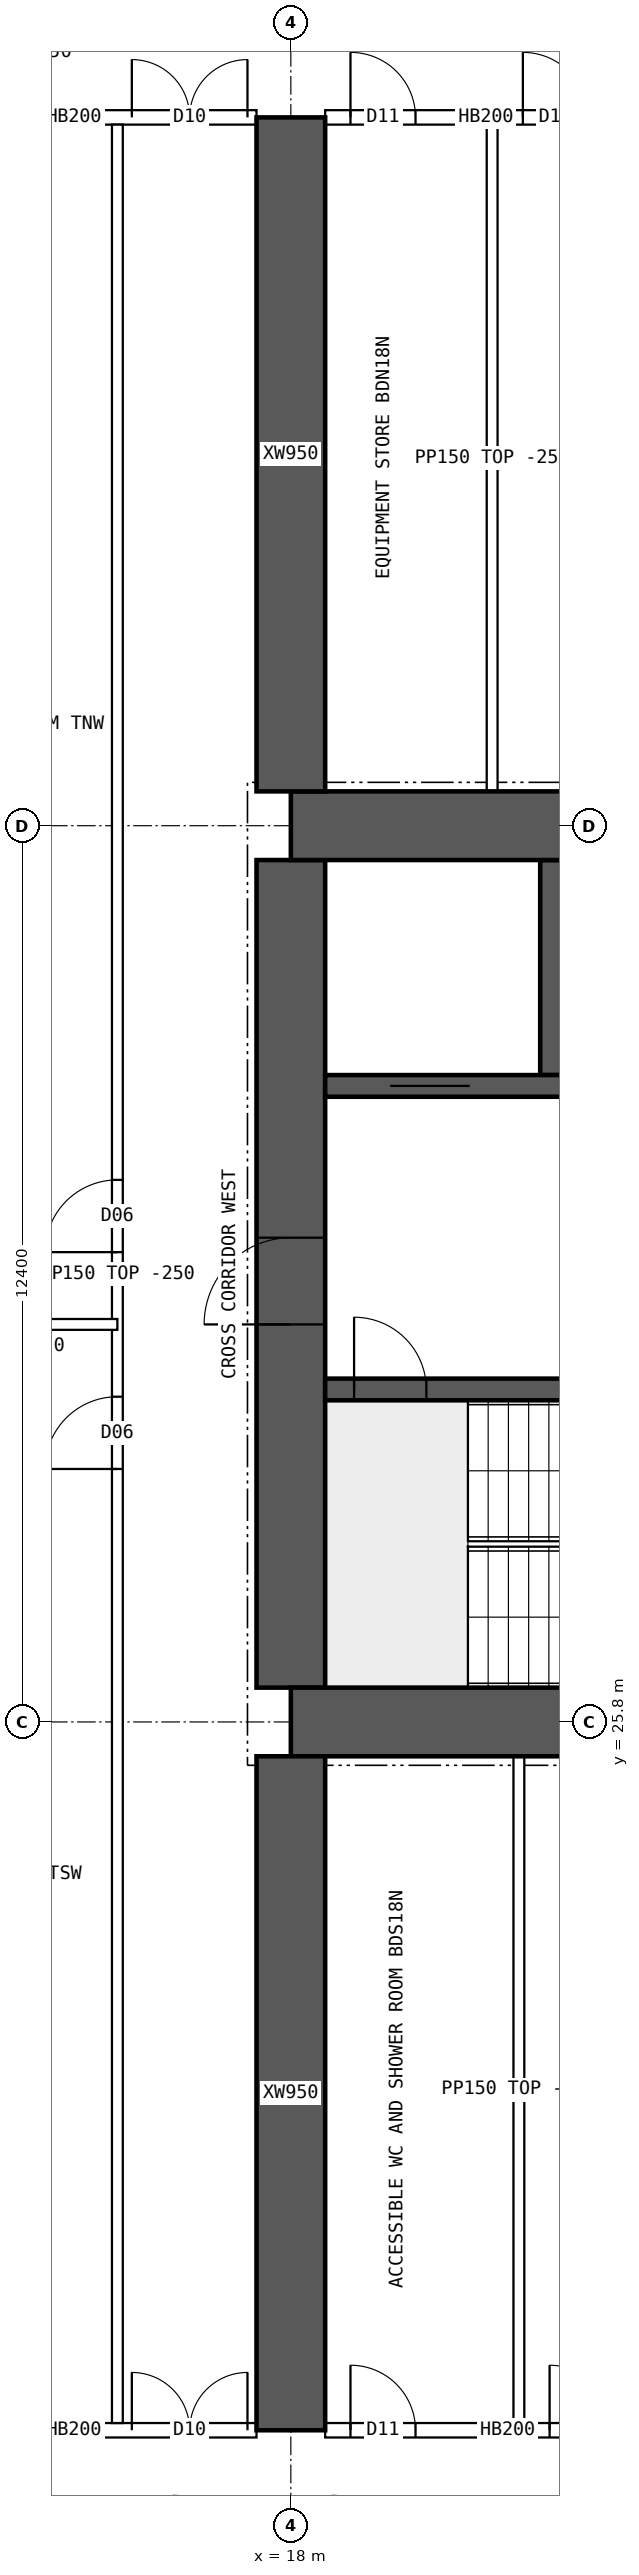
"""IFC4 building model, lengths in metres.
Left out: names, types, materials, properties, quantities, classifications, styles, units other than length and angle.
Written with IfcOpenShell. Run it as: python <this file> out.ifc"""

import sys

from ifc_helpers import new_model, si_unit, direction, frame, frame_2d, origin, place, context, subcontext, project, spatial, rectangle, extrude, element, fill, save


model = new_model("IFC4")
c1 = context("Model", 3, precision=1e-05, world=origin(), true_north=direction((0.0, 1.0)))
c2 = subcontext(c1, "Body", "Model", "MODEL_VIEW")
j1 = project(units=[si_unit("LENGTHUNIT", "METRE"), si_unit("PLANEANGLEUNIT", "RADIAN")], contexts=[c1])
p1 = place(None, origin())
s1 = spatial("IfcSite", under=j1, at=p1, CompositionType="ELEMENT")
p2 = place(p1, origin())
s2 = spatial("IfcBuilding", under=s1, at=p2, CompositionType="ELEMENT")
p3 = place(p2, frame((0.0, 0.0, 114.4)))
s3 = spatial("IfcBuildingStorey", under=s2, at=p3, CompositionType="ELEMENT", Elevation=114.4)
for number, where, z_axis, x_axis in (
    (1, (18.0, 25.8, 0.0), (0.0, 0.0, 1.0), (1.0, 0.0, 0.0)),
    (2, (18.0, 38.2, 0.0), (0.0, 0.0, 1.0), (1.0, 0.0, 0.0)),
):
    element("IfcWall", number, at=place(p3, frame(where, z_axis=z_axis, x_axis=x_axis)), inside=s3, PredefinedType="SHEAR", context=c2, shape_type="SweptSolid", body=[
        extrude(rectangle(XDim=48.0, YDim=0.95, at=frame_2d((24.0, 0.0))), origin(), (0.0, 0.0, 1.0), 3.75),
    ])
p4 = place(p3, frame((18.0, 26.275, 0.0), z_axis=(0.0, 0.0, 1.0), x_axis=(0.0, 1.0, 0.0)))
e3 = element("IfcWall", 3, at=p4, inside=s3, PredefinedType="SHEAR", context=c2, shape_type="SweptSolid", body=[
    extrude(rectangle(XDim=11.45, YDim=0.95, at=frame_2d((5.725, 0.0))), origin(), (0.0, 0.0, 1.0), 3.75),
])
p5 = place(p4, frame((5.025, 0.0, 0.0)))
e4 = element("IfcOpeningElement", 4, at=p5, cuts=e3, PredefinedType="OPENING", context=c2, shape_type="SweptSolid", body=[
    extrude(rectangle(XDim=1.2, YDim=2.1, at=frame_2d((0.6, 1.05))), frame((0.0, 0.485, 0.0), z_axis=(0.0, -1.0, 0.0), x_axis=(1.0, 0.0, 0.0)), (0.0, 0.0, 1.0), 0.97),
])
p6 = place(p3, frame((18.475, 30.4, 0.0), z_axis=(0.0, 0.0, 1.0), x_axis=(1.0, 0.0, 0.0)))
e5 = element("IfcWall", 5, at=p6, inside=s3, PredefinedType="SHEAR", context=c2, shape_type="SweptSolid", body=[
    extrude(rectangle(XDim=47.05, YDim=0.3, at=frame_2d((23.525, 0.0))), origin(), (0.0, 0.0, 1.0), 3.75),
])
p7 = place(p6, frame((0.4, 0.0, 0.0)))
e6 = element("IfcOpeningElement", 6, at=p7, cuts=e5, PredefinedType="OPENING", context=c2, shape_type="SweptSolid", body=[
    extrude(rectangle(XDim=1.0, YDim=2.1, at=frame_2d((0.5, 1.05))), frame((0.0, 0.16, 0.0), z_axis=(0.0, -1.0, 0.0), x_axis=(1.0, 0.0, 0.0)), (0.0, 0.0, 1.0), 0.32),
])
p8 = place(p6, frame((45.65, 0.0, 0.0)))
e7 = element("IfcOpeningElement", 7, at=p8, cuts=e5, PredefinedType="OPENING", context=c2, shape_type="SweptSolid", body=[
    extrude(rectangle(XDim=1.0, YDim=2.1, at=frame_2d((0.5, 1.05))), frame((0.0, 0.16, 0.0), z_axis=(0.0, -1.0, 0.0), x_axis=(1.0, 0.0, 0.0)), (0.0, 0.0, 1.0), 0.32),
])
p9 = place(p6, frame((8.275, 0.0, 0.0)))
e8 = element("IfcOpeningElement", 8, at=p9, cuts=e5, PredefinedType="OPENING", context=c2, shape_type="SweptSolid", body=[
    extrude(rectangle(XDim=1.1, YDim=2.1, at=frame_2d((0.55, 1.05))), frame((0.0, 0.16, 0.0), z_axis=(0.0, -1.0, 0.0), x_axis=(1.0, 0.0, 0.0)), (0.0, 0.0, 1.0), 0.32),
])
p10 = place(p6, frame((10.875, 0.0, 0.0)))
e9 = element("IfcOpeningElement", 9, at=p10, cuts=e5, PredefinedType="OPENING", context=c2, shape_type="SweptSolid", body=[
    extrude(rectangle(XDim=1.1, YDim=2.1, at=frame_2d((0.55, 1.05))), frame((0.0, 0.16, 0.0), z_axis=(0.0, -1.0, 0.0), x_axis=(1.0, 0.0, 0.0)), (0.0, 0.0, 1.0), 0.32),
])
p11 = place(p6, frame((13.475, 0.0, 0.0)))
e10 = element("IfcOpeningElement", 10, at=p11, cuts=e5, PredefinedType="OPENING", context=c2, shape_type="SweptSolid", body=[
    extrude(rectangle(XDim=1.1, YDim=2.1, at=frame_2d((0.55, 1.05))), frame((0.0, 0.16, 0.0), z_axis=(0.0, -1.0, 0.0), x_axis=(1.0, 0.0, 0.0)), (0.0, 0.0, 1.0), 0.32),
])
p12 = place(p6, frame((16.075, 0.0, 0.0)))
e11 = element("IfcOpeningElement", 11, at=p12, cuts=e5, PredefinedType="OPENING", context=c2, shape_type="SweptSolid", body=[
    extrude(rectangle(XDim=1.1, YDim=2.1, at=frame_2d((0.55, 1.05))), frame((0.0, 0.16, 0.0), z_axis=(0.0, -1.0, 0.0), x_axis=(1.0, 0.0, 0.0)), (0.0, 0.0, 1.0), 0.32),
])
p13 = place(p6, frame((18.85, 0.0, 0.0)))
e12 = element("IfcOpeningElement", 12, at=p13, cuts=e5, PredefinedType="OPENING", context=c2, shape_type="SweptSolid", body=[
    extrude(rectangle(XDim=0.9, YDim=2.1, at=frame_2d((0.45, 1.05))), frame((0.0, 0.16, 0.0), z_axis=(0.0, -1.0, 0.0), x_axis=(1.0, 0.0, 0.0)), (0.0, 0.0, 1.0), 0.32),
])
p14 = place(p6, frame((30.142, 0.0, 0.0)))
e13 = element("IfcOpeningElement", 13, at=p14, cuts=e5, PredefinedType="OPENING", context=c2, shape_type="SweptSolid", body=[
    extrude(rectangle(XDim=1.1, YDim=2.1, at=frame_2d((0.55, 1.05))), frame((0.0, 0.16, 0.0), z_axis=(0.0, -1.0, 0.0), x_axis=(1.0, 0.0, 0.0)), (0.0, 0.0, 1.0), 0.32),
])
p15 = place(p6, frame((33.675, 0.0, 0.0)))
e14 = element("IfcOpeningElement", 14, at=p15, cuts=e5, PredefinedType="OPENING", context=c2, shape_type="SweptSolid", body=[
    extrude(rectangle(XDim=1.1, YDim=2.1, at=frame_2d((0.55, 1.05))), frame((0.0, 0.16, 0.0), z_axis=(0.0, -1.0, 0.0), x_axis=(1.0, 0.0, 0.0)), (0.0, 0.0, 1.0), 0.32),
])
p16 = place(p6, frame((37.208, 0.0, 0.0)))
e15 = element("IfcOpeningElement", 15, at=p16, cuts=e5, PredefinedType="OPENING", context=c2, shape_type="SweptSolid", body=[
    extrude(rectangle(XDim=1.1, YDim=2.1, at=frame_2d((0.55, 1.05))), frame((0.0, 0.16, 0.0), z_axis=(0.0, -1.0, 0.0), x_axis=(1.0, 0.0, 0.0)), (0.0, 0.0, 1.0), 0.32),
])
p17 = place(p3, frame((18.475, 34.6, 0.0), z_axis=(0.0, 0.0, 1.0), x_axis=(1.0, 0.0, 0.0)))
e16 = element("IfcWall", 16, at=p17, inside=s3, PredefinedType="SHEAR", context=c2, shape_type="SweptSolid", body=[
    extrude(rectangle(XDim=47.05, YDim=0.3, at=frame_2d((23.525, 0.0))), origin(), (0.0, 0.0, 1.0), 3.75),
])
p18 = place(p17, frame((0.9, 0.0, 0.0)))
e17 = element("IfcOpeningElement", 17, at=p18, cuts=e16, PredefinedType="OPENING", context=c2, shape_type="SweptSolid", body=[
    extrude(rectangle(XDim=1.1, YDim=2.1, at=frame_2d((0.55, 1.05))), frame((0.0, 0.16, 0.0), z_axis=(0.0, -1.0, 0.0), x_axis=(1.0, 0.0, 0.0)), (0.0, 0.0, 1.0), 0.32),
])
p19 = place(p17, frame((45.05, 0.0, 0.0)))
e18 = element("IfcOpeningElement", 18, at=p19, cuts=e16, PredefinedType="OPENING", context=c2, shape_type="SweptSolid", body=[
    extrude(rectangle(XDim=1.1, YDim=2.1, at=frame_2d((0.55, 1.05))), frame((0.0, 0.16, 0.0), z_axis=(0.0, -1.0, 0.0), x_axis=(1.0, 0.0, 0.0)), (0.0, 0.0, 1.0), 0.32),
])
p20 = place(p17, frame((4.125, 0.0, 0.0)))
e19 = element("IfcOpeningElement", 19, at=p20, cuts=e16, PredefinedType="OPENING", context=c2, shape_type="SweptSolid", body=[
    extrude(rectangle(XDim=0.9, YDim=2.1, at=frame_2d((0.45, 1.05))), frame((0.0, 0.16, 0.0), z_axis=(0.0, -1.0, 0.0), x_axis=(1.0, 0.0, 0.0)), (0.0, 0.0, 1.0), 0.32),
])
p21 = place(p17, frame((42.025, 0.0, 0.0)))
e20 = element("IfcOpeningElement", 20, at=p21, cuts=e16, PredefinedType="OPENING", context=c2, shape_type="SweptSolid", body=[
    extrude(rectangle(XDim=0.9, YDim=2.1, at=frame_2d((0.45, 1.05))), frame((0.0, 0.16, 0.0), z_axis=(0.0, -1.0, 0.0), x_axis=(1.0, 0.0, 0.0)), (0.0, 0.0, 1.0), 0.32),
])
p22 = place(p17, frame((8.9, 0.0, 0.0)))
e21 = element("IfcOpeningElement", 21, at=p22, cuts=e16, PredefinedType="OPENING", context=c2, shape_type="SweptSolid", body=[
    extrude(rectangle(XDim=0.9, YDim=2.1, at=frame_2d((0.45, 1.05))), frame((0.0, 0.16, 0.0), z_axis=(0.0, -1.0, 0.0), x_axis=(1.0, 0.0, 0.0)), (0.0, 0.0, 1.0), 0.32),
])
p23 = place(p17, frame((12.874, 0.0, 0.0)))
e22 = element("IfcOpeningElement", 22, at=p23, cuts=e16, PredefinedType="OPENING", context=c2, shape_type="SweptSolid", body=[
    extrude(rectangle(XDim=0.9, YDim=2.1, at=frame_2d((0.45, 1.05))), frame((0.0, 0.16, 0.0), z_axis=(0.0, -1.0, 0.0), x_axis=(1.0, 0.0, 0.0)), (0.0, 0.0, 1.0), 0.32),
])
p24 = place(p17, frame((16.521, 0.0, 0.0)))
e23 = element("IfcOpeningElement", 23, at=p24, cuts=e16, PredefinedType="OPENING", context=c2, shape_type="SweptSolid", body=[
    extrude(rectangle(XDim=0.9, YDim=2.1, at=frame_2d((0.45, 1.05))), frame((0.0, 0.16, 0.0), z_axis=(0.0, -1.0, 0.0), x_axis=(1.0, 0.0, 0.0)), (0.0, 0.0, 1.0), 0.32),
])
p25 = place(p17, frame((20.28, 0.0, 0.0)))
e24 = element("IfcOpeningElement", 24, at=p25, cuts=e16, PredefinedType="OPENING", context=c2, shape_type="SweptSolid", body=[
    extrude(rectangle(XDim=0.9, YDim=2.1, at=frame_2d((0.45, 1.05))), frame((0.0, 0.16, 0.0), z_axis=(0.0, -1.0, 0.0), x_axis=(1.0, 0.0, 0.0)), (0.0, 0.0, 1.0), 0.32),
])
p26 = place(p17, frame((24.686, 0.0, 0.0)))
e25 = element("IfcOpeningElement", 25, at=p26, cuts=e16, PredefinedType="OPENING", context=c2, shape_type="SweptSolid", body=[
    extrude(rectangle(XDim=0.9, YDim=2.1, at=frame_2d((0.45, 1.05))), frame((0.0, 0.16, 0.0), z_axis=(0.0, -1.0, 0.0), x_axis=(1.0, 0.0, 0.0)), (0.0, 0.0, 1.0), 0.32),
])
p27 = place(p17, frame((27.483, 0.0, 0.0)))
e26 = element("IfcOpeningElement", 26, at=p27, cuts=e16, PredefinedType="OPENING", context=c2, shape_type="SweptSolid", body=[
    extrude(rectangle(XDim=0.9, YDim=2.1, at=frame_2d((0.45, 1.05))), frame((0.0, 0.16, 0.0), z_axis=(0.0, -1.0, 0.0), x_axis=(1.0, 0.0, 0.0)), (0.0, 0.0, 1.0), 0.32),
])
p28 = place(p17, frame((29.856, 0.0, 0.0)))
e27 = element("IfcOpeningElement", 27, at=p28, cuts=e16, PredefinedType="OPENING", context=c2, shape_type="SweptSolid", body=[
    extrude(rectangle(XDim=0.9, YDim=2.1, at=frame_2d((0.45, 1.05))), frame((0.0, 0.16, 0.0), z_axis=(0.0, -1.0, 0.0), x_axis=(1.0, 0.0, 0.0)), (0.0, 0.0, 1.0), 0.32),
])
p29 = place(p17, frame((33.706, 0.0, 0.0)))
e28 = element("IfcOpeningElement", 28, at=p29, cuts=e16, PredefinedType="OPENING", context=c2, shape_type="SweptSolid", body=[
    extrude(rectangle(XDim=0.9, YDim=2.1, at=frame_2d((0.45, 1.05))), frame((0.0, 0.16, 0.0), z_axis=(0.0, -1.0, 0.0), x_axis=(1.0, 0.0, 0.0)), (0.0, 0.0, 1.0), 0.32),
])
p30 = place(p17, frame((37.454, 0.0, 0.0)))
e29 = element("IfcOpeningElement", 29, at=p30, cuts=e16, PredefinedType="OPENING", context=c2, shape_type="SweptSolid", body=[
    extrude(rectangle(XDim=0.9, YDim=2.1, at=frame_2d((0.45, 1.05))), frame((0.0, 0.16, 0.0), z_axis=(0.0, -1.0, 0.0), x_axis=(1.0, 0.0, 0.0)), (0.0, 0.0, 1.0), 0.32),
])
p31 = place(p3, frame((21.6, 34.75, 0.0), z_axis=(0.0, 0.0, 1.0), x_axis=(0.0, 1.0, 0.0)))
e30 = element("IfcWall", 30, at=p31, inside=s3, PredefinedType="SHEAR", context=c2, shape_type="SweptSolid", body=[
    extrude(rectangle(XDim=2.975, YDim=0.3, at=frame_2d((1.488, 0.0))), origin(), (0.0, 0.0, 1.0), 3.75),
])
for number, where, z_axis, x_axis in (
    (31, (18.0, 16.0, 0.0), (0.0, 0.0, 1.0), (0.0, 1.0, 0.0)),
    (32, (18.0, 38.675, 0.0), (0.0, 0.0, 1.0), (0.0, 1.0, 0.0)),
):
    element("IfcWall", number, at=place(p3, frame(where, z_axis=z_axis, x_axis=x_axis)), inside=s3, PredefinedType="SHEAR", context=c2, shape_type="SweptSolid", body=[
        extrude(rectangle(XDim=9.325, YDim=0.95, at=frame_2d((4.663, 0.0))), origin(), (0.0, 0.0, 1.0), 3.75),
    ])
p32 = place(p3, frame((12.475, 16.0, 0.0), z_axis=(0.0, 0.0, 1.0), x_axis=(1.0, 0.0, 0.0)))
e33 = element("IfcWall", 33, at=p32, inside=s3, PredefinedType="SOLIDWALL", context=c2, shape_type="SweptSolid", body=[
    extrude(rectangle(XDim=5.05, YDim=0.2, at=frame_2d((2.525, 0.0))), origin(), (0.0, 0.0, 1.0), 3.5),
])
p33 = place(p32, frame((3.325, 0.0, 0.0)))
e34 = element("IfcOpeningElement", 34, at=p33, cuts=e33, PredefinedType="OPENING", context=c2, shape_type="SweptSolid", body=[
    extrude(rectangle(XDim=1.6, YDim=2.1, at=frame_2d((0.8, 1.05))), frame((0.0, 0.11, 0.0), z_axis=(0.0, -1.0, 0.0), x_axis=(1.0, 0.0, 0.0)), (0.0, 0.0, 1.0), 0.22),
])
p34 = place(p3, frame((18.475, 16.0, 0.0), z_axis=(0.0, 0.0, 1.0), x_axis=(1.0, 0.0, 0.0)))
e35 = element("IfcWall", 35, at=p34, inside=s3, PredefinedType="SOLIDWALL", context=c2, shape_type="SweptSolid", body=[
    extrude(rectangle(XDim=5.05, YDim=0.2, at=frame_2d((2.525, 0.0))), origin(), (0.0, 0.0, 1.0), 3.5),
])
p35 = place(p34, frame((0.35, 0.0, 0.0)))
e36 = element("IfcOpeningElement", 36, at=p35, cuts=e35, PredefinedType="OPENING", context=c2, shape_type="SweptSolid", body=[
    extrude(rectangle(XDim=0.9, YDim=2.1, at=frame_2d((0.45, 1.05))), frame((0.0, 0.11, 0.0), z_axis=(0.0, -1.0, 0.0), x_axis=(1.0, 0.0, 0.0)), (0.0, 0.0, 1.0), 0.22),
])
p36 = place(p34, frame((3.105, 0.0, 0.0)))
e37 = element("IfcOpeningElement", 37, at=p36, cuts=e35, PredefinedType="OPENING", context=c2, shape_type="SweptSolid", body=[
    extrude(rectangle(XDim=0.9, YDim=2.1, at=frame_2d((0.45, 1.05))), frame((0.0, 0.11, 0.0), z_axis=(0.0, -1.0, 0.0), x_axis=(1.0, 0.0, 0.0)), (0.0, 0.0, 1.0), 0.22),
])
p37 = place(p3, frame((12.475, 48.0, 0.0), z_axis=(0.0, 0.0, 1.0), x_axis=(1.0, 0.0, 0.0)))
e38 = element("IfcWall", 38, at=p37, inside=s3, PredefinedType="SOLIDWALL", context=c2, shape_type="SweptSolid", body=[
    extrude(rectangle(XDim=5.05, YDim=0.2, at=frame_2d((2.525, 0.0))), origin(), (0.0, 0.0, 1.0), 3.5),
])
p38 = place(p37, frame((3.325, 0.0, 0.0)))
e39 = element("IfcOpeningElement", 39, at=p38, cuts=e38, PredefinedType="OPENING", context=c2, shape_type="SweptSolid", body=[
    extrude(rectangle(XDim=1.6, YDim=2.1, at=frame_2d((0.8, 1.05))), frame((0.0, 0.11, 0.0), z_axis=(0.0, -1.0, 0.0), x_axis=(1.0, 0.0, 0.0)), (0.0, 0.0, 1.0), 0.22),
])
p39 = place(p3, frame((18.475, 48.0, 0.0), z_axis=(0.0, 0.0, 1.0), x_axis=(1.0, 0.0, 0.0)))
e40 = element("IfcWall", 40, at=p39, inside=s3, PredefinedType="SOLIDWALL", context=c2, shape_type="SweptSolid", body=[
    extrude(rectangle(XDim=5.05, YDim=0.2, at=frame_2d((2.525, 0.0))), origin(), (0.0, 0.0, 1.0), 3.5),
])
p40 = place(p39, frame((0.35, 0.0, 0.0)))
e41 = element("IfcOpeningElement", 41, at=p40, cuts=e40, PredefinedType="OPENING", context=c2, shape_type="SweptSolid", body=[
    extrude(rectangle(XDim=0.9, YDim=2.1, at=frame_2d((0.45, 1.05))), frame((0.0, 0.11, 0.0), z_axis=(0.0, -1.0, 0.0), x_axis=(1.0, 0.0, 0.0)), (0.0, 0.0, 1.0), 0.22),
])
p41 = place(p39, frame((2.735, 0.0, 0.0)))
e42 = element("IfcOpeningElement", 42, at=p41, cuts=e40, PredefinedType="OPENING", context=c2, shape_type="SweptSolid", body=[
    extrude(rectangle(XDim=0.9, YDim=2.1, at=frame_2d((0.45, 1.05))), frame((0.0, 0.11, 0.0), z_axis=(0.0, -1.0, 0.0), x_axis=(1.0, 0.0, 0.0)), (0.0, 0.0, 1.0), 0.22),
])
for number, where, z_axis, x_axis in (
    (43, (21.155, 16.1, 0.0), (0.0, 0.0, 1.0), (0.0, 1.0, 0.0)),
    (44, (20.785, 38.675, 0.0), (0.0, 0.0, 1.0), (0.0, 1.0, 0.0)),
):
    element("IfcWall", number, at=place(p3, frame(where, z_axis=z_axis, x_axis=x_axis)), inside=s3, PredefinedType="PARTITIONING", context=c2, shape_type="SweptSolid", body=[
        extrude(rectangle(XDim=9.225, YDim=0.15, at=frame_2d((4.612, 0.0))), origin(), (0.0, 0.0, 1.0), 3.5),
    ])
p42 = place(p3, frame((15.6, 16.1, 0.0), z_axis=(0.0, 0.0, 1.0), x_axis=(0.0, 1.0, 0.0)))
e45 = element("IfcWall", 45, at=p42, inside=s3, PredefinedType="PARTITIONING", context=c2, shape_type="SweptSolid", body=[
    extrude(rectangle(XDim=31.8, YDim=0.15, at=frame_2d((15.9, 0.0))), origin(), (0.0, 0.0, 1.0), 3.5),
])
p43 = place(p42, frame((13.2, 0.0, 0.0)))
e46 = element("IfcOpeningElement", 46, at=p43, cuts=e45, PredefinedType="OPENING", context=c2, shape_type="SweptSolid", body=[
    extrude(rectangle(XDim=1.0, YDim=2.1, at=frame_2d((0.5, 1.05))), frame((0.0, 0.085, 0.0), z_axis=(0.0, -1.0, 0.0), x_axis=(1.0, 0.0, 0.0)), (0.0, 0.0, 1.0), 0.17),
])
p44 = place(p42, frame((16.2, 0.0, 0.0)))
e47 = element("IfcOpeningElement", 47, at=p44, cuts=e45, PredefinedType="OPENING", context=c2, shape_type="SweptSolid", body=[
    extrude(rectangle(XDim=1.0, YDim=2.1, at=frame_2d((0.5, 1.05))), frame((0.0, 0.085, 0.0), z_axis=(0.0, -1.0, 0.0), x_axis=(1.0, 0.0, 0.0)), (0.0, 0.0, 1.0), 0.17),
])
p45 = place(p3, frame((12.0, 31.3, 0.0), z_axis=(0.0, 0.0, 1.0), x_axis=(1.0, 0.0, 0.0)))
e48 = element("IfcWall", 48, at=p45, inside=s3, PredefinedType="PARTITIONING", context=c2, shape_type="SweptSolid", body=[
    extrude(rectangle(XDim=3.6, YDim=0.15, at=frame_2d((1.8, 0.0))), origin(), (0.0, 0.0, 1.0), 3.5),
])
p46 = place(p5, origin())
e49 = element("IfcDoor", 49, at=p46, inside=s3, OperationType="SINGLE_SWING_LEFT", PredefinedType="DOOR", context=c2, shape_type="SweptSolid", body=[
    extrude(rectangle(XDim=1.2, YDim=2.1, at=frame_2d((0.6, 1.05))), frame((0.0, 0.025, 0.0), z_axis=(0.0, -1.0, 0.0), x_axis=(1.0, 0.0, 0.0)), (0.0, 0.0, 1.0), 0.05),
])
fill(e4, e49)
p47 = place(p7, origin())
e50 = element("IfcDoor", 50, at=p47, inside=s3, OperationType="SINGLE_SWING_LEFT", PredefinedType="DOOR", context=c2, shape_type="SweptSolid", body=[
    extrude(rectangle(XDim=1.0, YDim=2.1, at=frame_2d((0.5, 1.05))), frame((0.0, 0.025, 0.0), z_axis=(0.0, -1.0, 0.0), x_axis=(1.0, 0.0, 0.0)), (0.0, 0.0, 1.0), 0.05),
])
fill(e6, e50)
p48 = place(p18, origin())
e51 = element("IfcDoor", 51, at=p48, inside=s3, OperationType="DOUBLE_DOOR_SLIDING", PredefinedType="DOOR", context=c2, shape_type="SweptSolid", body=[
    extrude(rectangle(XDim=1.1, YDim=2.1, at=frame_2d((0.55, 1.05))), frame((0.0, 0.025, 0.0), z_axis=(0.0, -1.0, 0.0), x_axis=(1.0, 0.0, 0.0)), (0.0, 0.0, 1.0), 0.05),
])
fill(e17, e51)
p49 = place(p33, origin())
e52 = element("IfcDoor", 52, at=p49, inside=s3, OperationType="DOUBLE_DOOR_SINGLE_SWING", PredefinedType="DOOR", context=c2, shape_type="SweptSolid", body=[
    extrude(rectangle(XDim=1.6, YDim=2.1, at=frame_2d((0.8, 1.05))), frame((0.0, 0.025, 0.0), z_axis=(0.0, -1.0, 0.0), x_axis=(1.0, 0.0, 0.0)), (0.0, 0.0, 1.0), 0.05),
])
fill(e34, e52)
p50 = place(p38, origin())
e53 = element("IfcDoor", 53, at=p50, inside=s3, OperationType="DOUBLE_DOOR_SINGLE_SWING", PredefinedType="DOOR", context=c2, shape_type="SweptSolid", body=[
    extrude(rectangle(XDim=1.6, YDim=2.1, at=frame_2d((0.8, 1.05))), frame((0.0, 0.025, 0.0), z_axis=(0.0, -1.0, 0.0), x_axis=(1.0, 0.0, 0.0)), (0.0, 0.0, 1.0), 0.05),
])
fill(e39, e53)
p51 = place(p35, origin())
e54 = element("IfcDoor", 54, at=p51, inside=s3, OperationType="SINGLE_SWING_LEFT", PredefinedType="DOOR", context=c2, shape_type="SweptSolid", body=[
    extrude(rectangle(XDim=0.9, YDim=2.1, at=frame_2d((0.45, 1.05))), frame((0.0, 0.025, 0.0), z_axis=(0.0, -1.0, 0.0), x_axis=(1.0, 0.0, 0.0)), (0.0, 0.0, 1.0), 0.05),
])
fill(e36, e54)
p52 = place(p36, origin())
e55 = element("IfcDoor", 55, at=p52, inside=s3, OperationType="SINGLE_SWING_LEFT", PredefinedType="DOOR", context=c2, shape_type="SweptSolid", body=[
    extrude(rectangle(XDim=0.9, YDim=2.1, at=frame_2d((0.45, 1.05))), frame((0.0, 0.025, 0.0), z_axis=(0.0, -1.0, 0.0), x_axis=(1.0, 0.0, 0.0)), (0.0, 0.0, 1.0), 0.05),
])
fill(e37, e55)
p53 = place(p40, origin())
e56 = element("IfcDoor", 56, at=p53, inside=s3, OperationType="SINGLE_SWING_LEFT", PredefinedType="DOOR", context=c2, shape_type="SweptSolid", body=[
    extrude(rectangle(XDim=0.9, YDim=2.1, at=frame_2d((0.45, 1.05))), frame((0.0, 0.025, 0.0), z_axis=(0.0, -1.0, 0.0), x_axis=(1.0, 0.0, 0.0)), (0.0, 0.0, 1.0), 0.05),
])
fill(e41, e56)
p54 = place(p41, origin())
e57 = element("IfcDoor", 57, at=p54, inside=s3, OperationType="SINGLE_SWING_LEFT", PredefinedType="DOOR", context=c2, shape_type="SweptSolid", body=[
    extrude(rectangle(XDim=0.9, YDim=2.1, at=frame_2d((0.45, 1.05))), frame((0.0, 0.025, 0.0), z_axis=(0.0, -1.0, 0.0), x_axis=(1.0, 0.0, 0.0)), (0.0, 0.0, 1.0), 0.05),
])
fill(e42, e57)
p55 = place(p43, origin())
e58 = element("IfcDoor", 58, at=p55, inside=s3, OperationType="SINGLE_SWING_LEFT", PredefinedType="DOOR", context=c2, shape_type="SweptSolid", body=[
    extrude(rectangle(XDim=1.0, YDim=2.1, at=frame_2d((0.5, 1.05))), frame((0.0, 0.025, 0.0), z_axis=(0.0, -1.0, 0.0), x_axis=(1.0, 0.0, 0.0)), (0.0, 0.0, 1.0), 0.05),
])
fill(e46, e58)
p56 = place(p44, origin())
e59 = element("IfcDoor", 59, at=p56, inside=s3, OperationType="SINGLE_SWING_LEFT", PredefinedType="DOOR", context=c2, shape_type="SweptSolid", body=[
    extrude(rectangle(XDim=1.0, YDim=2.1, at=frame_2d((0.5, 1.05))), frame((0.0, 0.025, 0.0), z_axis=(0.0, -1.0, 0.0), x_axis=(1.0, 0.0, 0.0)), (0.0, 0.0, 1.0), 0.05),
])
fill(e47, e59)
save(model, sys.argv[1])
